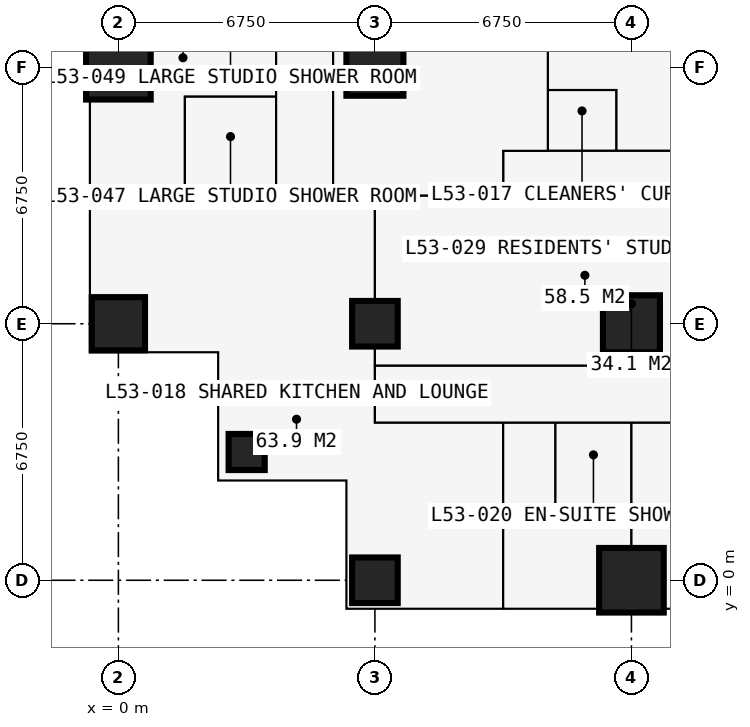
"""IFC4 building model, lengths in metres.
Left out: names, types, materials, properties, quantities, classifications, styles, units other than length and angle.
Written with IfcOpenShell. Run it as: python <this file> out.ifc"""

import sys

from ifc_helpers import new_model, si_unit, direction, frame, frame_2d, origin, origin_2d, place, context, subcontext, project, spatial, rectangle, extrude, element, fill, save


model = new_model("IFC4")
c1 = context("Model", 3, precision=1e-05, world=origin(), true_north=direction((0.0, 1.0)))
c2 = subcontext(c1, "Body", "Model", "MODEL_VIEW")
j1 = project(units=[si_unit("LENGTHUNIT", "METRE"), si_unit("PLANEANGLEUNIT", "RADIAN")], contexts=[c1])
p1 = place(None, origin())
s1 = spatial("IfcSite", under=j1, at=p1, CompositionType="ELEMENT")
p2 = place(p1, origin())
s2 = spatial("IfcBuilding", under=s1, at=p2, CompositionType="ELEMENT")
p3 = place(p2, frame((0.0, 0.0, 196.2)))
s3 = spatial("IfcBuildingStorey", under=s2, at=p3, CompositionType="ELEMENT", Elevation=196.2)
p4 = place(p3, frame((0.0, 6.75, 0.0), z_axis=(0.0, 0.0, 1.0), x_axis=(1.0, 0.0, 0.0)))
e1 = element("IfcColumn", 1, at=p4, inside=s3, PredefinedType="COLUMN", context=c2, shape_type="SweptSolid", body=[
    extrude(rectangle(XDim=1.4, YDim=1.4, at=origin_2d()), origin(), (0.0, 0.0, 1.0), 3.6),
])
p5 = place(p3, frame((0.0, 13.5, 0.0), z_axis=(0.0, 0.0, 1.0), x_axis=(1.0, 0.0, 0.0)))
e2 = element("IfcColumn", 2, at=p5, inside=s3, PredefinedType="COLUMN", context=c2, shape_type="SweptSolid", body=[
    extrude(rectangle(XDim=1.7, YDim=1.7, at=origin_2d()), origin(), (0.0, 0.0, 1.0), 3.6),
])
p6 = place(p3, frame((3.375, 3.375, 0.0), z_axis=(0.0, 0.0, 1.0), x_axis=(1.0, 0.0, 0.0)))
e3 = element("IfcColumn", 3, at=p6, inside=s3, PredefinedType="COLUMN", context=c2, shape_type="SweptSolid", body=[
    extrude(rectangle(XDim=0.95, YDim=0.95, at=origin_2d()), origin(), (0.0, 0.0, 1.0), 3.6),
])
for number, where, z_axis, x_axis in (
    (4, (6.75, 0.0, 0.0), (0.0, 0.0, 1.0), (1.0, 0.0, 0.0)),
    (5, (6.75, 6.75, 0.0), (0.0, 0.0, 1.0), (1.0, 0.0, 0.0)),
):
    element("IfcColumn", number, at=place(p3, frame(where, z_axis=z_axis, x_axis=x_axis)), inside=s3, PredefinedType="COLUMN", context=c2, shape_type="SweptSolid", body=[
        extrude(rectangle(XDim=1.2, YDim=1.2, at=origin_2d()), origin(), (0.0, 0.0, 1.0), 3.6),
    ])
p7 = place(p3, frame((6.75, 13.5, 0.0), z_axis=(0.0, 0.0, 1.0), x_axis=(1.0, 0.0, 0.0)))
e6 = element("IfcColumn", 6, at=p7, inside=s3, PredefinedType="COLUMN", context=c2, shape_type="SweptSolid", body=[
    extrude(rectangle(XDim=1.5, YDim=1.5, at=origin_2d()), origin(), (0.0, 0.0, 1.0), 3.6),
])
p8 = place(p3, frame((13.5, 0.0, 0.0), z_axis=(0.0, 0.0, 1.0), x_axis=(1.0, 0.0, 0.0)))
e7 = element("IfcColumn", 7, at=p8, inside=s3, PredefinedType="COLUMN", context=c2, shape_type="SweptSolid", body=[
    extrude(rectangle(XDim=1.7, YDim=1.7, at=origin_2d()), origin(), (0.0, 0.0, 1.0), 3.6),
])
p9 = place(p3, frame((13.5, 6.75, 0.0), z_axis=(0.0, 0.0, 1.0), x_axis=(1.0, 0.0, 0.0)))
e8 = element("IfcColumn", 8, at=p9, inside=s3, PredefinedType="COLUMN", context=c2, shape_type="SweptSolid", body=[
    extrude(rectangle(XDim=1.5, YDim=1.5, at=origin_2d()), origin(), (0.0, 0.0, 1.0), 3.6),
])
p10 = place(p3, frame((13.1, 13.5, 0.0), z_axis=(0.0, 0.0, 1.0), x_axis=(1.0, 0.0, 0.0)))
e9 = element("IfcWall", 9, at=p10, inside=s3, PredefinedType="SHEAR", context=c2, shape_type="SweptSolid", body=[
    extrude(rectangle(XDim=14.3, YDim=1.2, at=frame_2d((7.15, 0.0))), origin(), (0.0, 0.0, 1.0), 3.6),
])
p11 = place(p3, frame((-0.75, 6.0, 0.0), z_axis=(0.0, 0.0, 1.0), x_axis=(1.0, 0.0, 0.0)))
e10 = element("IfcWall", 10, at=p11, inside=s3, PredefinedType="SOLIDWALL", context=c2, shape_type="SweptSolid", body=[
    extrude(rectangle(XDim=3.375, YDim=0.3, at=frame_2d((1.688, 0.0))), origin(), (0.0, 0.0, 1.0), 3.3),
])
p12 = place(p11, frame((1.583, 0.0, 0.9)))
e11 = element("IfcOpeningElement", 11, at=p12, cuts=e10, PredefinedType="OPENING", context=c2, shape_type="SweptSolid", body=[
    extrude(rectangle(XDim=1.5, YDim=1.8, at=frame_2d((0.75, 0.9))), frame((0.0, 0.16, 0.0), z_axis=(0.0, -1.0, 0.0), x_axis=(1.0, 0.0, 0.0)), (0.0, 0.0, 1.0), 0.32),
])
p13 = place(p3, frame((2.625, 6.0, 0.0), z_axis=(0.0, 0.0, 1.0), x_axis=(0.0, -1.0, 0.0)))
e12 = element("IfcWall", 12, at=p13, inside=s3, PredefinedType="SOLIDWALL", context=c2, shape_type="SweptSolid", body=[
    extrude(rectangle(XDim=3.375, YDim=0.3, at=frame_2d((1.688, 0.0))), origin(), (0.0, 0.0, 1.0), 3.3),
])
p14 = place(p13, frame((0.788, 0.0, 0.6)))
e13 = element("IfcOpeningElement", 13, at=p14, cuts=e12, PredefinedType="OPENING", context=c2, shape_type="SweptSolid", body=[
    extrude(rectangle(XDim=1.8, YDim=2.1, at=frame_2d((0.9, 1.05))), frame((0.0, 0.16, 0.0), z_axis=(0.0, -1.0, 0.0), x_axis=(1.0, 0.0, 0.0)), (0.0, 0.0, 1.0), 0.32),
])
p15 = place(p3, frame((2.625, 2.625, 0.0), z_axis=(0.0, 0.0, 1.0), x_axis=(1.0, 0.0, 0.0)))
e14 = element("IfcWall", 14, at=p15, inside=s3, PredefinedType="SOLIDWALL", context=c2, shape_type="SweptSolid", body=[
    extrude(rectangle(XDim=3.375, YDim=0.3, at=frame_2d((1.688, 0.0))), origin(), (0.0, 0.0, 1.0), 3.3),
])
p16 = place(p15, frame((0.788, 0.0, 0.6)))
e15 = element("IfcOpeningElement", 15, at=p16, cuts=e14, PredefinedType="OPENING", context=c2, shape_type="SweptSolid", body=[
    extrude(rectangle(XDim=1.8, YDim=2.1, at=frame_2d((0.9, 1.05))), frame((0.0, 0.16, 0.0), z_axis=(0.0, -1.0, 0.0), x_axis=(1.0, 0.0, 0.0)), (0.0, 0.0, 1.0), 0.32),
])
p17 = place(p3, frame((6.0, 2.625, 0.0), z_axis=(0.0, 0.0, 1.0), x_axis=(0.0, -1.0, 0.0)))
e16 = element("IfcWall", 16, at=p17, inside=s3, PredefinedType="SOLIDWALL", context=c2, shape_type="SweptSolid", body=[
    extrude(rectangle(XDim=3.375, YDim=0.3, at=frame_2d((1.688, 0.0))), origin(), (0.0, 0.0, 1.0), 3.3),
])
p18 = place(p17, frame((0.788, 0.0, 0.6)))
e17 = element("IfcOpeningElement", 17, at=p18, cuts=e16, PredefinedType="OPENING", context=c2, shape_type="SweptSolid", body=[
    extrude(rectangle(XDim=1.8, YDim=2.1, at=frame_2d((0.9, 1.05))), frame((0.0, 0.16, 0.0), z_axis=(0.0, -1.0, 0.0), x_axis=(1.0, 0.0, 0.0)), (0.0, 0.0, 1.0), 0.32),
])
p19 = place(p3, frame((-0.734, 10.125, 0.0), z_axis=(0.0, 0.0, 1.0), x_axis=(1.0, 0.0, 0.0)))
e18 = element("IfcWall", 18, at=p19, inside=s3, PredefinedType="PARTITIONING", context=c2, shape_type="SweptSolid", body=[
    extrude(rectangle(XDim=10.859, YDim=0.15, at=frame_2d((5.429, 0.0))), origin(), (0.0, 0.0, 1.0), 3.3),
])
p20 = place(p3, frame((1.75, 10.125, 0.0), z_axis=(0.0, 0.0, 1.0), x_axis=(0.0, 1.0, 0.0)))
e19 = element("IfcWall", 19, at=p20, inside=s3, PredefinedType="PARTITIONING", context=c2, shape_type="SweptSolid", body=[
    extrude(rectangle(XDim=2.6, YDim=0.1, at=frame_2d((1.3, 0.0))), origin(), (0.0, 0.0, 1.0), 3.3),
])
p21 = place(p20, frame((0.85, 0.0, 0.0)))
e20 = element("IfcOpeningElement", 20, at=p21, cuts=e19, PredefinedType="OPENING", context=c2, shape_type="SweptSolid", body=[
    extrude(rectangle(XDim=0.9, YDim=2.2, at=frame_2d((0.45, 1.1))), frame((0.0, 0.06, 0.0), z_axis=(0.0, -1.0, 0.0), x_axis=(1.0, 0.0, 0.0)), (0.0, 0.0, 1.0), 0.12),
])
p22 = place(p3, frame((1.75, 12.725, 0.0), z_axis=(0.0, 0.0, 1.0), x_axis=(1.0, 0.0, 0.0)))
e21 = element("IfcWall", 21, at=p22, inside=s3, PredefinedType="PARTITIONING", context=c2, shape_type="SweptSolid", body=[
    extrude(rectangle(XDim=2.4, YDim=0.1, at=frame_2d((1.2, 0.0))), origin(), (0.0, 0.0, 1.0), 3.3),
])
p23 = place(p3, frame((4.15, 10.125, 0.0), z_axis=(0.0, 0.0, 1.0), x_axis=(0.0, 1.0, 0.0)))
e22 = element("IfcWall", 22, at=p23, inside=s3, PredefinedType="PARTITIONING", context=c2, shape_type="SweptSolid", body=[
    extrude(rectangle(XDim=16.875, YDim=0.1, at=frame_2d((8.438, 0.0))), origin(), (0.0, 0.0, 1.0), 3.3),
])
p24 = place(p23, frame((4.2, 0.0, 0.0)))
e23 = element("IfcOpeningElement", 23, at=p24, cuts=e22, PredefinedType="OPENING", context=c2, shape_type="SweptSolid", body=[
    extrude(rectangle(XDim=0.95, YDim=2.2, at=frame_2d((0.475, 1.1))), frame((0.0, 0.06, 0.0), z_axis=(0.0, -1.0, 0.0), x_axis=(1.0, 0.0, 0.0)), (0.0, 0.0, 1.0), 0.12),
])
p25 = place(p23, frame((10.95, 0.0, 0.0)))
e24 = element("IfcOpeningElement", 24, at=p25, cuts=e22, PredefinedType="OPENING", context=c2, shape_type="SweptSolid", body=[
    extrude(rectangle(XDim=0.95, YDim=2.2, at=frame_2d((0.475, 1.1))), frame((0.0, 0.06, 0.0), z_axis=(0.0, -1.0, 0.0), x_axis=(1.0, 0.0, 0.0)), (0.0, 0.0, 1.0), 0.12),
])
p26 = place(p3, frame((5.65, 10.125, 0.0), z_axis=(0.0, 0.0, 1.0), x_axis=(0.0, 1.0, 0.0)))
e25 = element("IfcWall", 25, at=p26, inside=s3, PredefinedType="PARTITIONING", context=c2, shape_type="SweptSolid", body=[
    extrude(rectangle(XDim=10.762, YDim=0.15, at=frame_2d((5.381, 0.0))), origin(), (0.0, 0.0, 1.0), 3.3),
])
p27 = place(p26, frame((4.9, 0.0, 0.0)))
e26 = element("IfcOpeningElement", 26, at=p27, cuts=e25, PredefinedType="OPENING", context=c2, shape_type="SweptSolid", body=[
    extrude(rectangle(XDim=0.95, YDim=2.2, at=frame_2d((0.475, 1.1))), frame((0.0, 0.085, 0.0), z_axis=(0.0, -1.0, 0.0), x_axis=(1.0, 0.0, 0.0)), (0.0, 0.0, 1.0), 0.17),
])
p28 = place(p3, frame((6.75, 4.15, 0.0), z_axis=(0.0, 0.0, 1.0), x_axis=(0.0, 1.0, 0.0)))
e27 = element("IfcWall", 27, at=p28, inside=s3, PredefinedType="PARTITIONING", context=c2, shape_type="SweptSolid", body=[
    extrude(rectangle(XDim=5.975, YDim=0.15, at=frame_2d((2.988, 0.0))), origin(), (0.0, 0.0, 1.0), 2.802),
])
p29 = place(p3, frame((6.75, 4.15, 0.0), z_axis=(0.0, 0.0, 1.0), x_axis=(1.0, 0.0, 0.0)))
e28 = element("IfcWall", 28, at=p29, inside=s3, PredefinedType="PARTITIONING", context=c2, shape_type="SweptSolid", body=[
    extrude(rectangle(XDim=20.25, YDim=0.15, at=frame_2d((10.125, 0.0))), origin(), (0.0, 0.0, 1.0), 3.3),
])
p30 = place(p29, frame((1.2, 0.0, 0.0)))
e29 = element("IfcOpeningElement", 29, at=p30, cuts=e28, PredefinedType="OPENING", context=c2, shape_type="SweptSolid", body=[
    extrude(rectangle(XDim=1.0, YDim=2.2, at=frame_2d((0.5, 1.1))), frame((0.0, 0.085, 0.0), z_axis=(0.0, -1.0, 0.0), x_axis=(1.0, 0.0, 0.0)), (0.0, 0.0, 1.0), 0.17),
])
p31 = place(p29, frame((3.575, 0.0, 0.0)))
e30 = element("IfcOpeningElement", 30, at=p31, cuts=e28, PredefinedType="OPENING", context=c2, shape_type="SweptSolid", body=[
    extrude(rectangle(XDim=0.95, YDim=2.2, at=frame_2d((0.475, 1.1))), frame((0.0, 0.085, 0.0), z_axis=(0.0, -1.0, 0.0), x_axis=(1.0, 0.0, 0.0)), (0.0, 0.0, 1.0), 0.17),
])
p32 = place(p29, frame((7.0, 0.0, 0.0)))
e31 = element("IfcOpeningElement", 31, at=p32, cuts=e28, PredefinedType="OPENING", context=c2, shape_type="SweptSolid", body=[
    extrude(rectangle(XDim=0.95, YDim=2.2, at=frame_2d((0.475, 1.1))), frame((0.0, 0.085, 0.0), z_axis=(0.0, -1.0, 0.0), x_axis=(1.0, 0.0, 0.0)), (0.0, 0.0, 1.0), 0.17),
])
p33 = place(p29, frame((10.375, 0.0, 0.0)))
e32 = element("IfcOpeningElement", 32, at=p33, cuts=e28, PredefinedType="OPENING", context=c2, shape_type="SweptSolid", body=[
    extrude(rectangle(XDim=0.95, YDim=2.2, at=frame_2d((0.475, 1.1))), frame((0.0, 0.085, 0.0), z_axis=(0.0, -1.0, 0.0), x_axis=(1.0, 0.0, 0.0)), (0.0, 0.0, 1.0), 0.17),
])
p34 = place(p29, frame((15.1, 0.0, 0.0)))
e33 = element("IfcOpeningElement", 33, at=p34, cuts=e28, PredefinedType="OPENING", context=c2, shape_type="SweptSolid", body=[
    extrude(rectangle(XDim=0.95, YDim=2.2, at=frame_2d((0.475, 1.1))), frame((0.0, 0.085, 0.0), z_axis=(0.0, -1.0, 0.0), x_axis=(1.0, 0.0, 0.0)), (0.0, 0.0, 1.0), 0.17),
])
p35 = place(p3, frame((6.75, 5.65, 0.0), z_axis=(0.0, 0.0, 1.0), x_axis=(1.0, 0.0, 0.0)))
e34 = element("IfcWall", 34, at=p35, inside=s3, PredefinedType="PARTITIONING", context=c2, shape_type="SweptSolid", body=[
    extrude(rectangle(XDim=11.05, YDim=0.15, at=frame_2d((5.525, 0.0))), origin(), (0.0, 0.0, 1.0), 3.3),
])
p36 = place(p3, frame((10.125, -0.734, 0.0), z_axis=(0.0, 0.0, 1.0), x_axis=(0.0, 1.0, 0.0)))
e35 = element("IfcWall", 35, at=p36, inside=s3, PredefinedType="PARTITIONING", context=c2, shape_type="SweptSolid", body=[
    extrude(rectangle(XDim=4.884, YDim=0.15, at=frame_2d((2.442, 0.0))), origin(), (0.0, 0.0, 1.0), 3.3),
])
p37 = place(p3, frame((10.125, 10.125, 0.0), z_axis=(0.0, 0.0, 1.0), x_axis=(0.0, 1.0, 0.0)))
e36 = element("IfcWall", 36, at=p37, inside=s3, PredefinedType="PARTITIONING", context=c2, shape_type="SweptSolid", body=[
    extrude(rectangle(XDim=1.175, YDim=0.15, at=frame_2d((0.587, 0.0))), origin(), (0.0, 0.0, 1.0), 3.3),
])
p38 = place(p3, frame((10.125, 11.3, 0.0), z_axis=(0.0, 0.0, 1.0), x_axis=(1.0, 0.0, 0.0)))
e37 = element("IfcWall", 37, at=p38, inside=s3, PredefinedType="PARTITIONING", context=c2, shape_type="SweptSolid", body=[
    extrude(rectangle(XDim=20.475, YDim=0.15, at=frame_2d((10.238, 0.0))), origin(), (0.0, 0.0, 1.0), 3.3),
])
p39 = place(p38, frame((8.425, 0.0, 0.0)))
e38 = element("IfcOpeningElement", 38, at=p39, cuts=e37, PredefinedType="OPENING", context=c2, shape_type="SweptSolid", body=[
    extrude(rectangle(XDim=1.0, YDim=2.2, at=frame_2d((0.5, 1.1))), frame((0.0, 0.085, 0.0), z_axis=(0.0, -1.0, 0.0), x_axis=(1.0, 0.0, 0.0)), (0.0, 0.0, 1.0), 0.17),
])
p40 = place(p38, frame((10.975, 0.0, 0.0)))
e39 = element("IfcOpeningElement", 39, at=p40, cuts=e37, PredefinedType="OPENING", context=c2, shape_type="SweptSolid", body=[
    extrude(rectangle(XDim=1.0, YDim=2.2, at=frame_2d((0.5, 1.1))), frame((0.0, 0.085, 0.0), z_axis=(0.0, -1.0, 0.0), x_axis=(1.0, 0.0, 0.0)), (0.0, 0.0, 1.0), 0.17),
])
p41 = place(p38, frame((4.875, 0.0, 0.0)))
e40 = element("IfcOpeningElement", 40, at=p41, cuts=e37, PredefinedType="OPENING", context=c2, shape_type="SweptSolid", body=[
    extrude(rectangle(XDim=0.95, YDim=2.2, at=frame_2d((0.475, 1.1))), frame((0.0, 0.085, 0.0), z_axis=(0.0, -1.0, 0.0), x_axis=(1.0, 0.0, 0.0)), (0.0, 0.0, 1.0), 0.17),
])
p42 = place(p3, frame((11.3, 11.3, 0.0), z_axis=(0.0, 0.0, 1.0), x_axis=(0.0, 1.0, 0.0)))
e41 = element("IfcWall", 41, at=p42, inside=s3, PredefinedType="PARTITIONING", context=c2, shape_type="SweptSolid", body=[
    extrude(rectangle(XDim=19.3, YDim=0.15, at=frame_2d((9.65, 0.0))), origin(), (0.0, 0.0, 1.0), 3.3),
])
p43 = place(p42, frame((18.1, 0.0, 0.0)))
e42 = element("IfcOpeningElement", 42, at=p43, cuts=e41, PredefinedType="OPENING", context=c2, shape_type="SweptSolid", body=[
    extrude(rectangle(XDim=1.0, YDim=2.2, at=frame_2d((0.5, 1.1))), frame((0.0, 0.085, 0.0), z_axis=(0.0, -1.0, 0.0), x_axis=(1.0, 0.0, 0.0)), (0.0, 0.0, 1.0), 0.17),
])
p44 = place(p42, frame((10.137, 0.0, 0.0)))
e43 = element("IfcOpeningElement", 43, at=p44, cuts=e41, PredefinedType="OPENING", context=c2, shape_type="SweptSolid", body=[
    extrude(rectangle(XDim=1.0, YDim=2.2, at=frame_2d((0.5, 1.1))), frame((0.0, 0.085, 0.0), z_axis=(0.0, -1.0, 0.0), x_axis=(1.0, 0.0, 0.0)), (0.0, 0.0, 1.0), 0.17),
])
p45 = place(p3, frame((11.3, 12.9, 0.0), z_axis=(0.0, 0.0, 1.0), x_axis=(1.0, 0.0, 0.0)))
e44 = element("IfcWall", 44, at=p45, inside=s3, PredefinedType="PARTITIONING", context=c2, shape_type="SweptSolid", body=[
    extrude(rectangle(XDim=1.8, YDim=0.15, at=frame_2d((0.9, 0.0))), origin(), (0.0, 0.0, 1.0), 2.802),
])
p46 = place(p45, frame((0.4, 0.0, 0.0)))
e45 = element("IfcOpeningElement", 45, at=p46, cuts=e44, PredefinedType="OPENING", context=c2, shape_type="SweptSolid", body=[
    extrude(rectangle(XDim=0.95, YDim=2.2, at=frame_2d((0.475, 1.1))), frame((0.0, 0.085, 0.0), z_axis=(0.0, -1.0, 0.0), x_axis=(1.0, 0.0, 0.0)), (0.0, 0.0, 1.0), 0.17),
])
p47 = place(p3, frame((11.5, 1.95, 0.0), z_axis=(0.0, 0.0, 1.0), x_axis=(0.0, 1.0, 0.0)))
e46 = element("IfcWall", 46, at=p47, inside=s3, PredefinedType="PARTITIONING", context=c2, shape_type="SweptSolid", body=[
    extrude(rectangle(XDim=2.2, YDim=0.1, at=frame_2d((1.1, 0.0))), origin(), (0.0, 0.0, 1.0), 3.3),
])
p48 = place(p47, frame((0.65, 0.0, 0.0)))
e47 = element("IfcOpeningElement", 47, at=p48, cuts=e46, PredefinedType="OPENING", context=c2, shape_type="SweptSolid", body=[
    extrude(rectangle(XDim=0.9, YDim=2.2, at=frame_2d((0.45, 1.1))), frame((0.0, 0.06, 0.0), z_axis=(0.0, -1.0, 0.0), x_axis=(1.0, 0.0, 0.0)), (0.0, 0.0, 1.0), 0.12),
])
p49 = place(p3, frame((11.5, 1.95, 0.0), z_axis=(0.0, 0.0, 1.0), x_axis=(1.0, 0.0, 0.0)))
e48 = element("IfcWall", 48, at=p49, inside=s3, PredefinedType="PARTITIONING", context=c2, shape_type="SweptSolid", body=[
    extrude(rectangle(XDim=2.0, YDim=0.1, at=frame_2d((1.0, 0.0))), origin(), (0.0, 0.0, 1.0), 3.3),
])
p50 = place(p3, frame((13.1, 11.3, 0.0), z_axis=(0.0, 0.0, 1.0), x_axis=(0.0, 1.0, 0.0)))
e49 = element("IfcWall", 49, at=p50, inside=s3, PredefinedType="PARTITIONING", context=c2, shape_type="SweptSolid", body=[
    extrude(rectangle(XDim=1.6, YDim=0.15, at=frame_2d((0.8, 0.0))), origin(), (0.0, 0.0, 1.0), 3.3),
])
p51 = place(p3, frame((13.5, -0.734, 0.0), z_axis=(0.0, 0.0, 1.0), x_axis=(0.0, 1.0, 0.0)))
e50 = element("IfcWall", 50, at=p51, inside=s3, PredefinedType="PARTITIONING", context=c2, shape_type="SweptSolid", body=[
    extrude(rectangle(XDim=4.884, YDim=0.175, at=frame_2d((2.442, 0.0))), origin(), (0.0, 0.0, 1.0), 2.802),
])
p52 = place(p12, origin())
e51 = element("IfcWindow", 51, at=p52, inside=s3, PartitioningType="SINGLE_PANEL", PredefinedType="WINDOW", context=c2, shape_type="SweptSolid", body=[
    extrude(rectangle(XDim=1.5, YDim=1.8, at=frame_2d((0.75, 0.9))), frame((0.0, 0.03, 0.0), z_axis=(0.0, -1.0, 0.0), x_axis=(1.0, 0.0, 0.0)), (0.0, 0.0, 1.0), 0.06),
])
fill(e11, e51)
p53 = place(p14, origin())
e52 = element("IfcWindow", 52, at=p53, inside=s3, PartitioningType="SINGLE_PANEL", PredefinedType="WINDOW", context=c2, shape_type="SweptSolid", body=[
    extrude(rectangle(XDim=1.8, YDim=2.1, at=frame_2d((0.9, 1.05))), frame((0.0, 0.03, 0.0), z_axis=(0.0, -1.0, 0.0), x_axis=(1.0, 0.0, 0.0)), (0.0, 0.0, 1.0), 0.06),
])
fill(e13, e52)
p54 = place(p16, origin())
e53 = element("IfcWindow", 53, at=p54, inside=s3, PartitioningType="SINGLE_PANEL", PredefinedType="WINDOW", context=c2, shape_type="SweptSolid", body=[
    extrude(rectangle(XDim=1.8, YDim=2.1, at=frame_2d((0.9, 1.05))), frame((0.0, 0.03, 0.0), z_axis=(0.0, -1.0, 0.0), x_axis=(1.0, 0.0, 0.0)), (0.0, 0.0, 1.0), 0.06),
])
fill(e15, e53)
p55 = place(p18, origin())
e54 = element("IfcWindow", 54, at=p55, inside=s3, PartitioningType="SINGLE_PANEL", PredefinedType="WINDOW", context=c2, shape_type="SweptSolid", body=[
    extrude(rectangle(XDim=1.8, YDim=2.1, at=frame_2d((0.9, 1.05))), frame((0.0, 0.03, 0.0), z_axis=(0.0, -1.0, 0.0), x_axis=(1.0, 0.0, 0.0)), (0.0, 0.0, 1.0), 0.06),
])
fill(e17, e54)
p56 = place(p46, origin())
e55 = element("IfcDoor", 55, at=p56, inside=s3, OperationType="SINGLE_SWING_LEFT", PredefinedType="DOOR", context=c2, shape_type="SweptSolid", body=[
    extrude(rectangle(XDim=0.95, YDim=2.2, at=frame_2d((0.475, 1.1))), frame((0.0, 0.025, 0.0), z_axis=(0.0, -1.0, 0.0), x_axis=(1.0, 0.0, 0.0)), (0.0, 0.0, 1.0), 0.05),
])
fill(e45, e55)
p57 = place(p30, origin())
e56 = element("IfcDoor", 56, at=p57, inside=s3, OperationType="SINGLE_SWING_LEFT", PredefinedType="DOOR", context=c2, shape_type="SweptSolid", body=[
    extrude(rectangle(XDim=1.0, YDim=2.2, at=frame_2d((0.5, 1.1))), frame((0.0, 0.025, 0.0), z_axis=(0.0, -1.0, 0.0), x_axis=(1.0, 0.0, 0.0)), (0.0, 0.0, 1.0), 0.05),
])
fill(e29, e56)
p58 = place(p31, origin())
e57 = element("IfcDoor", 57, at=p58, inside=s3, OperationType="SINGLE_SWING_LEFT", PredefinedType="DOOR", context=c2, shape_type="SweptSolid", body=[
    extrude(rectangle(XDim=0.95, YDim=2.2, at=frame_2d((0.475, 1.1))), frame((0.0, 0.025, 0.0), z_axis=(0.0, -1.0, 0.0), x_axis=(1.0, 0.0, 0.0)), (0.0, 0.0, 1.0), 0.05),
])
fill(e30, e57)
p59 = place(p48, origin())
e58 = element("IfcDoor", 58, at=p59, inside=s3, OperationType="SINGLE_SWING_RIGHT", PredefinedType="DOOR", context=c2, shape_type="SweptSolid", body=[
    extrude(rectangle(XDim=0.9, YDim=2.2, at=frame_2d((0.45, 1.1))), frame((0.0, 0.025, 0.0), z_axis=(0.0, -1.0, 0.0), x_axis=(1.0, 0.0, 0.0)), (0.0, 0.0, 1.0), 0.05),
])
fill(e47, e58)
p60 = place(p32, origin())
e59 = element("IfcDoor", 59, at=p60, inside=s3, OperationType="SINGLE_SWING_LEFT", PredefinedType="DOOR", context=c2, shape_type="SweptSolid", body=[
    extrude(rectangle(XDim=0.95, YDim=2.2, at=frame_2d((0.475, 1.1))), frame((0.0, 0.025, 0.0), z_axis=(0.0, -1.0, 0.0), x_axis=(1.0, 0.0, 0.0)), (0.0, 0.0, 1.0), 0.05),
])
fill(e31, e59)
p61 = place(p21, origin())
e60 = element("IfcDoor", 60, at=p61, inside=s3, OperationType="SINGLE_SWING_RIGHT", PredefinedType="DOOR", context=c2, shape_type="SweptSolid", body=[
    extrude(rectangle(XDim=0.9, YDim=2.2, at=frame_2d((0.45, 1.1))), frame((0.0, 0.025, 0.0), z_axis=(0.0, -1.0, 0.0), x_axis=(1.0, 0.0, 0.0)), (0.0, 0.0, 1.0), 0.05),
])
fill(e20, e60)
save(model, sys.argv[1])
